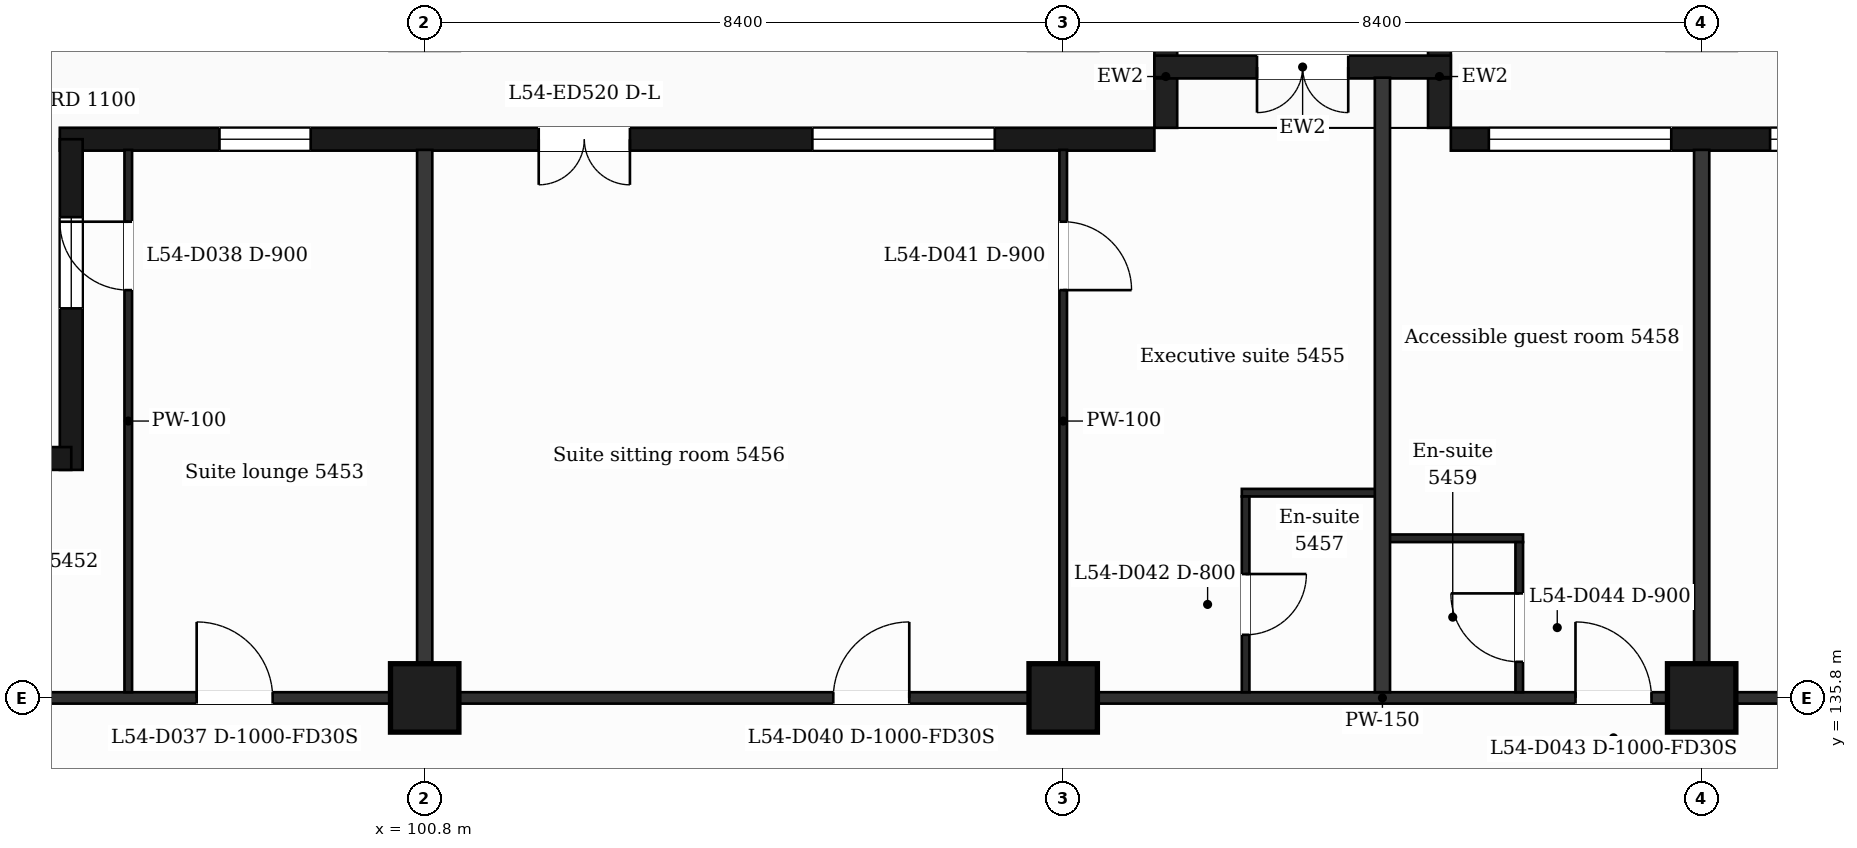
"""IFC4 building model, lengths in metres.
Left out: names, types, materials, properties, quantities, classifications, styles, units other than length and angle.
Written with IfcOpenShell. Run it as: python <this file> out.ifc"""

import sys

from ifc_helpers import new_model, si_unit, direction, frame, frame_2d, origin, origin_2d, place, context, subcontext, project, spatial, rectangle, extrude, element, fill, save


model = new_model("IFC4")
c1 = context("Model", 3, precision=1e-05, world=origin(), true_north=direction((0.0, 1.0)))
c2 = subcontext(c1, "Body", "Model", "MODEL_VIEW")
j1 = project(units=[si_unit("LENGTHUNIT", "METRE"), si_unit("PLANEANGLEUNIT", "RADIAN")], contexts=[c1])
p1 = place(None, origin())
s1 = spatial("IfcSite", under=j1, at=p1, CompositionType="ELEMENT")
p2 = place(p1, origin())
s2 = spatial("IfcBuilding", under=s1, at=p2, CompositionType="ELEMENT")
p3 = place(p2, frame((0.0, 0.0, 224.4)))
s3 = spatial("IfcBuildingStorey", under=s2, at=p3, CompositionType="ELEMENT", Elevation=224.4)
for number, where, z_axis, x_axis in (
    (1, (100.8, 135.8, 0.0), (0.0, 0.0, 1.0), (1.0, 0.0, 0.0)),
    (2, (109.2, 135.8, 0.0), (0.0, 0.0, 1.0), (1.0, 0.0, 0.0)),
    (3, (117.6, 135.8, 0.0), (0.0, 0.0, 1.0), (1.0, 0.0, 0.0)),
):
    element("IfcColumn", number, at=place(p3, frame(where, z_axis=z_axis, x_axis=x_axis)), inside=s3, PredefinedType="COLUMN", context=c2, shape_type="SweptSolid", body=[
        extrude(rectangle(XDim=0.9, YDim=0.9, at=origin_2d()), origin(), (0.0, 0.0, 1.0), 3.7),
    ])
p4 = place(p3, frame((130.65, 143.15, 0.0), z_axis=(0.0, 0.0, 1.0), x_axis=(-1.0, 0.0, 0.0)))
e4 = element("IfcWall", 4, at=p4, inside=s3, PredefinedType="SOLIDWALL", context=c2, shape_type="SweptSolid", body=[
    extrude(rectangle(XDim=16.35, YDim=0.3, at=frame_2d((8.175, 0.0))), origin(), (0.0, 0.0, 1.0), 3.38),
])
p5 = place(p4, frame((1.95, 0.0, 0.9)))
e5 = element("IfcOpeningElement", 5, at=p5, cuts=e4, PredefinedType="OPENING", context=c2, shape_type="SweptSolid", body=[
    extrude(rectangle(XDim=1.2, YDim=2.1, at=frame_2d((0.6, 1.05))), frame((0.0, 0.16, 0.0), z_axis=(0.0, -1.0, 0.0), x_axis=(1.0, 0.0, 0.0)), (0.0, 0.0, 1.0), 0.32),
])
p6 = place(p4, frame((6.15, 0.0, 0.0)))
e6 = element("IfcOpeningElement", 6, at=p6, cuts=e4, PredefinedType="OPENING", context=c2, shape_type="SweptSolid", body=[
    extrude(rectangle(XDim=1.2, YDim=2.4, at=frame_2d((0.6, 1.2))), frame((0.0, 0.16, 0.0), z_axis=(0.0, -1.0, 0.0), x_axis=(1.0, 0.0, 0.0)), (0.0, 0.0, 1.0), 0.32),
])
p7 = place(p4, frame((9.75, 0.0, 0.9)))
e7 = element("IfcOpeningElement", 7, at=p7, cuts=e4, PredefinedType="OPENING", context=c2, shape_type="SweptSolid", body=[
    extrude(rectangle(XDim=2.4, YDim=2.1, at=frame_2d((1.2, 1.05))), frame((0.0, 0.16, 0.0), z_axis=(0.0, -1.0, 0.0), x_axis=(1.0, 0.0, 0.0)), (0.0, 0.0, 1.0), 0.32),
])
p8 = place(p4, frame((13.45, 0.0, 0.9)))
e8 = element("IfcOpeningElement", 8, at=p8, cuts=e4, PredefinedType="OPENING", context=c2, shape_type="SweptSolid", body=[
    extrude(rectangle(XDim=2.4, YDim=2.1, at=frame_2d((1.2, 1.05))), frame((0.0, 0.16, 0.0), z_axis=(0.0, -1.0, 0.0), x_axis=(1.0, 0.0, 0.0)), (0.0, 0.0, 1.0), 0.32),
])
p9 = place(p3, frame((110.4, 143.15, 0.0), z_axis=(0.0, 0.0, 1.0), x_axis=(-1.0, 0.0, 0.0)))
e9 = element("IfcWall", 9, at=p9, inside=s3, PredefinedType="SOLIDWALL", context=c2, shape_type="SweptSolid", body=[
    extrude(rectangle(XDim=14.4, YDim=0.3, at=frame_2d((7.2, 0.0))), origin(), (0.0, 0.0, 1.0), 3.38),
])
p10 = place(p9, frame((2.1, 0.0, 0.9)))
e10 = element("IfcOpeningElement", 10, at=p10, cuts=e9, PredefinedType="OPENING", context=c2, shape_type="SweptSolid", body=[
    extrude(rectangle(XDim=2.4, YDim=2.1, at=frame_2d((1.2, 1.05))), frame((0.0, 0.16, 0.0), z_axis=(0.0, -1.0, 0.0), x_axis=(1.0, 0.0, 0.0)), (0.0, 0.0, 1.0), 0.32),
])
p11 = place(p9, frame((6.9, 0.0, 0.0)))
e11 = element("IfcOpeningElement", 11, at=p11, cuts=e9, PredefinedType="OPENING", context=c2, shape_type="SweptSolid", body=[
    extrude(rectangle(XDim=1.2, YDim=2.4, at=frame_2d((0.6, 1.2))), frame((0.0, 0.16, 0.0), z_axis=(0.0, -1.0, 0.0), x_axis=(1.0, 0.0, 0.0)), (0.0, 0.0, 1.0), 0.32),
])
p12 = place(p9, frame((11.1, 0.0, 0.9)))
e12 = element("IfcOpeningElement", 12, at=p12, cuts=e9, PredefinedType="OPENING", context=c2, shape_type="SweptSolid", body=[
    extrude(rectangle(XDim=1.2, YDim=2.1, at=frame_2d((0.6, 1.05))), frame((0.0, 0.16, 0.0), z_axis=(0.0, -1.0, 0.0), x_axis=(1.0, 0.0, 0.0)), (0.0, 0.0, 1.0), 0.32),
])
for number, where, z_axis, x_axis in (
    (13, (114.15, 143.3, 0.0), (0.0, 0.0, 1.0), (0.0, 1.0, 0.0)),
    (14, (110.55, 143.3, 0.0), (0.0, 0.0, 1.0), (0.0, 1.0, 0.0)),
):
    element("IfcWall", number, at=place(p3, frame(where, z_axis=z_axis, x_axis=x_axis)), inside=s3, PredefinedType="SOLIDWALL", context=c2, shape_type="SweptSolid", body=[
        extrude(rectangle(XDim=1.35, YDim=0.3, at=frame_2d((0.675, 0.0))), origin(), (0.0, 0.0, 1.0), 3.38),
    ])
p13 = place(p3, frame((114.3, 144.1, 0.0), z_axis=(0.0, 0.0, 1.0), x_axis=(-1.0, 0.0, 0.0)))
e15 = element("IfcWall", 15, at=p13, inside=s3, PredefinedType="SOLIDWALL", context=c2, shape_type="SweptSolid", body=[
    extrude(rectangle(XDim=3.9, YDim=0.3, at=frame_2d((1.95, 0.0))), origin(), (0.0, 0.0, 1.0), 3.38),
])
p14 = place(p13, frame((1.35, 0.0, 0.0)))
e16 = element("IfcOpeningElement", 16, at=p14, cuts=e15, PredefinedType="OPENING", context=c2, shape_type="SweptSolid", body=[
    extrude(rectangle(XDim=1.2, YDim=2.4, at=frame_2d((0.6, 1.2))), frame((0.0, 0.16, 0.0), z_axis=(0.0, -1.0, 0.0), x_axis=(1.0, 0.0, 0.0)), (0.0, 0.0, 1.0), 0.32),
])
p15 = place(p3, frame((96.15, 143.15, 0.0), z_axis=(0.0, 0.0, 1.0), x_axis=(0.0, -1.0, 0.0)))
e17 = element("IfcWall", 17, at=p15, inside=s3, PredefinedType="SOLIDWALL", context=c2, shape_type="SweptSolid", body=[
    extrude(rectangle(XDim=4.35, YDim=0.3, at=frame_2d((2.175, 0.0))), origin(), (0.0, 0.0, 1.0), 3.38),
])
p16 = place(p15, frame((1.025, 0.0, 0.9)))
e18 = element("IfcOpeningElement", 18, at=p16, cuts=e17, PredefinedType="OPENING", context=c2, shape_type="SweptSolid", body=[
    extrude(rectangle(XDim=1.2, YDim=2.1, at=frame_2d((0.6, 1.05))), frame((0.0, 0.16, 0.0), z_axis=(0.0, -1.0, 0.0), x_axis=(1.0, 0.0, 0.0)), (0.0, 0.0, 1.0), 0.32),
])
p17 = place(p3, frame((96.15, 138.95, 0.0), z_axis=(0.0, 0.0, 1.0), x_axis=(-1.0, 0.0, 0.0)))
e19 = element("IfcWall", 19, at=p17, inside=s3, PredefinedType="SOLIDWALL", context=c2, shape_type="SweptSolid", body=[
    extrude(rectangle(XDim=5.104, YDim=0.3, at=frame_2d((2.552, 0.0))), origin(), (0.0, 0.0, 1.0), 3.38),
])
p18 = place(p17, frame((0.725, 0.0, 0.9)))
e20 = element("IfcOpeningElement", 20, at=p18, cuts=e19, PredefinedType="OPENING", context=c2, shape_type="SweptSolid", body=[
    extrude(rectangle(XDim=2.4, YDim=2.1, at=frame_2d((1.2, 1.05))), frame((0.0, 0.16, 0.0), z_axis=(0.0, -1.0, 0.0), x_axis=(1.0, 0.0, 0.0)), (0.0, 0.0, 1.0), 0.32),
])
p19 = place(p3, frame((90.895, 135.8, 0.0), z_axis=(0.0, 0.0, 1.0), x_axis=(1.0, 0.0, 0.0)))
e21 = element("IfcWall", 21, at=p19, inside=s3, PredefinedType="PARTITIONING", context=c2, shape_type="SweptSolid", body=[
    extrude(rectangle(XDim=45.011, YDim=0.15, at=frame_2d((22.505, 0.0))), origin(), (0.0, 0.0, 1.0), 3.38),
])
p20 = place(p19, frame((6.906, 0.0, 0.0)))
e22 = element("IfcOpeningElement", 22, at=p20, cuts=e21, PredefinedType="OPENING", context=c2, shape_type="SweptSolid", body=[
    extrude(rectangle(XDim=1.0, YDim=2.1, at=frame_2d((0.5, 1.05))), frame((0.0, 0.085, 0.0), z_axis=(0.0, -1.0, 0.0), x_axis=(1.0, 0.0, 0.0)), (0.0, 0.0, 1.0), 0.17),
])
p21 = place(p19, frame((15.281, 0.0, 0.0)))
e23 = element("IfcOpeningElement", 23, at=p21, cuts=e21, PredefinedType="OPENING", context=c2, shape_type="SweptSolid", body=[
    extrude(rectangle(XDim=1.0, YDim=2.1, at=frame_2d((0.5, 1.05))), frame((0.0, 0.085, 0.0), z_axis=(0.0, -1.0, 0.0), x_axis=(1.0, 0.0, 0.0)), (0.0, 0.0, 1.0), 0.17),
])
p22 = place(p19, frame((25.045, 0.0, 0.0)))
e24 = element("IfcOpeningElement", 24, at=p22, cuts=e21, PredefinedType="OPENING", context=c2, shape_type="SweptSolid", body=[
    extrude(rectangle(XDim=1.0, YDim=2.1, at=frame_2d((0.5, 1.05))), frame((0.0, 0.085, 0.0), z_axis=(0.0, -1.0, 0.0), x_axis=(1.0, 0.0, 0.0)), (0.0, 0.0, 1.0), 0.17),
])
p23 = place(p19, frame((29.531, 0.0, 0.0)))
e25 = element("IfcOpeningElement", 25, at=p23, cuts=e21, PredefinedType="OPENING", context=c2, shape_type="SweptSolid", body=[
    extrude(rectangle(XDim=0.95, YDim=2.1, at=frame_2d((0.475, 1.05))), frame((0.0, 0.085, 0.0), z_axis=(0.0, -1.0, 0.0), x_axis=(1.0, 0.0, 0.0)), (0.0, 0.0, 1.0), 0.17),
])
p24 = place(p19, frame((39.814, 0.0, 0.0)))
e26 = element("IfcOpeningElement", 26, at=p24, cuts=e21, PredefinedType="OPENING", context=c2, shape_type="SweptSolid", body=[
    extrude(rectangle(XDim=0.95, YDim=2.1, at=frame_2d((0.475, 1.05))), frame((0.0, 0.085, 0.0), z_axis=(0.0, -1.0, 0.0), x_axis=(1.0, 0.0, 0.0)), (0.0, 0.0, 1.0), 0.17),
])
p25 = place(p3, frame((113.4, 137.9, 0.0), z_axis=(0.0, 0.0, 1.0), x_axis=(1.0, 0.0, 0.0)))
e27 = element("IfcWall", 27, at=p25, inside=s3, PredefinedType="PARTITIONING", context=c2, shape_type="SweptSolid", body=[
    extrude(rectangle(XDim=1.85, YDim=0.1, at=frame_2d((0.925, 0.0))), origin(), (0.0, 0.0, 1.0), 3.38),
])
p26 = place(p3, frame((111.55, 138.5, 0.0), z_axis=(0.0, 0.0, 1.0), x_axis=(1.0, 0.0, 0.0)))
e28 = element("IfcWall", 28, at=p26, inside=s3, PredefinedType="PARTITIONING", context=c2, shape_type="SweptSolid", body=[
    extrude(rectangle(XDim=1.85, YDim=0.1, at=frame_2d((0.925, 0.0))), origin(), (0.0, 0.0, 1.0), 3.38),
])
p27 = place(p3, frame((96.9, 135.875, 0.0), z_axis=(0.0, 0.0, 1.0), x_axis=(0.0, 1.0, 0.0)))
e29 = element("IfcWall", 29, at=p27, inside=s3, PredefinedType="PARTITIONING", context=c2, shape_type="SweptSolid", body=[
    extrude(rectangle(XDim=7.135, YDim=0.1, at=frame_2d((3.567, 0.0))), origin(), (0.0, 0.0, 1.0), 3.38),
])
p28 = place(p27, frame((5.29, 0.0, 0.0)))
e30 = element("IfcOpeningElement", 30, at=p28, cuts=e29, PredefinedType="OPENING", context=c2, shape_type="SweptSolid", body=[
    extrude(rectangle(XDim=0.9, YDim=2.1, at=frame_2d((0.45, 1.05))), frame((0.0, 0.06, 0.0), z_axis=(0.0, -1.0, 0.0), x_axis=(1.0, 0.0, 0.0)), (0.0, 0.0, 1.0), 0.12),
])
p29 = place(p3, frame((100.8, 135.875, 0.0), z_axis=(0.0, 0.0, 1.0), x_axis=(0.0, 1.0, 0.0)))
e31 = element("IfcWall", 31, at=p29, inside=s3, PredefinedType="PARTITIONING", context=c2, shape_type="SweptSolid", body=[
    extrude(rectangle(XDim=7.135, YDim=0.2, at=frame_2d((3.567, 0.0))), origin(), (0.0, 0.0, 1.0), 3.38),
])
p30 = place(p3, frame((109.2, 135.875, 0.0), z_axis=(0.0, 0.0, 1.0), x_axis=(0.0, 1.0, 0.0)))
e32 = element("IfcWall", 32, at=p30, inside=s3, PredefinedType="PARTITIONING", context=c2, shape_type="SweptSolid", body=[
    extrude(rectangle(XDim=7.135, YDim=0.1, at=frame_2d((3.567, 0.0))), origin(), (0.0, 0.0, 1.0), 3.38),
])
p31 = place(p30, frame((5.29, 0.0, 0.0)))
e33 = element("IfcOpeningElement", 33, at=p31, cuts=e32, PredefinedType="OPENING", context=c2, shape_type="SweptSolid", body=[
    extrude(rectangle(XDim=0.9, YDim=2.1, at=frame_2d((0.45, 1.05))), frame((0.0, 0.06, 0.0), z_axis=(0.0, -1.0, 0.0), x_axis=(1.0, 0.0, 0.0)), (0.0, 0.0, 1.0), 0.12),
])
p32 = place(p3, frame((111.6, 135.875, 0.0), z_axis=(0.0, 0.0, 1.0), x_axis=(0.0, 1.0, 0.0)))
e34 = element("IfcWall", 34, at=p32, inside=s3, PredefinedType="PARTITIONING", context=c2, shape_type="SweptSolid", body=[
    extrude(rectangle(XDim=2.575, YDim=0.1, at=frame_2d((1.288, 0.0))), origin(), (0.0, 0.0, 1.0), 3.38),
])
p33 = place(p32, frame((0.755, 0.0, 0.0)))
e35 = element("IfcOpeningElement", 35, at=p33, cuts=e34, PredefinedType="OPENING", context=c2, shape_type="SweptSolid", body=[
    extrude(rectangle(XDim=0.8, YDim=2.1, at=frame_2d((0.4, 1.05))), frame((0.0, 0.06, 0.0), z_axis=(0.0, -1.0, 0.0), x_axis=(1.0, 0.0, 0.0)), (0.0, 0.0, 1.0), 0.12),
])
p34 = place(p3, frame((113.4, 135.875, 0.0), z_axis=(0.0, 0.0, 1.0), x_axis=(0.0, 1.0, 0.0)))
e36 = element("IfcWall", 36, at=p34, inside=s3, PredefinedType="PARTITIONING", context=c2, shape_type="SweptSolid", body=[
    extrude(rectangle(XDim=8.085, YDim=0.2, at=frame_2d((4.042, 0.0))), origin(), (0.0, 0.0, 1.0), 3.38),
])
p35 = place(p3, frame((115.2, 135.875, 0.0), z_axis=(0.0, 0.0, 1.0), x_axis=(0.0, 1.0, 0.0)))
e37 = element("IfcWall", 37, at=p35, inside=s3, PredefinedType="PARTITIONING", context=c2, shape_type="SweptSolid", body=[
    extrude(rectangle(XDim=1.975, YDim=0.1, at=frame_2d((0.988, 0.0))), origin(), (0.0, 0.0, 1.0), 3.38),
])
p36 = place(p35, frame((0.4, 0.0, 0.0)))
e38 = element("IfcOpeningElement", 38, at=p36, cuts=e37, PredefinedType="OPENING", context=c2, shape_type="SweptSolid", body=[
    extrude(rectangle(XDim=0.9, YDim=2.1, at=frame_2d((0.45, 1.05))), frame((0.0, 0.06, 0.0), z_axis=(0.0, -1.0, 0.0), x_axis=(1.0, 0.0, 0.0)), (0.0, 0.0, 1.0), 0.12),
])
p37 = place(p3, frame((117.6, 135.875, 0.0), z_axis=(0.0, 0.0, 1.0), x_axis=(0.0, 1.0, 0.0)))
e39 = element("IfcWall", 39, at=p37, inside=s3, PredefinedType="PARTITIONING", context=c2, shape_type="SweptSolid", body=[
    extrude(rectangle(XDim=7.135, YDim=0.2, at=frame_2d((3.567, 0.0))), origin(), (0.0, 0.0, 1.0), 3.38),
])
p38 = place(p7, origin())
e40 = element("IfcWindow", 40, at=p38, inside=s3, PartitioningType="SINGLE_PANEL", PredefinedType="WINDOW", context=c2, shape_type="SweptSolid", body=[
    extrude(rectangle(XDim=2.4, YDim=2.1, at=frame_2d((1.2, 1.05))), frame((0.0, 0.03, 0.0), z_axis=(0.0, -1.0, 0.0), x_axis=(1.0, 0.0, 0.0)), (0.0, 0.0, 1.0), 0.06),
])
fill(e7, e40)
p39 = place(p8, origin())
e41 = element("IfcWindow", 41, at=p39, inside=s3, PartitioningType="SINGLE_PANEL", PredefinedType="WINDOW", context=c2, shape_type="SweptSolid", body=[
    extrude(rectangle(XDim=2.4, YDim=2.1, at=frame_2d((1.2, 1.05))), frame((0.0, 0.03, 0.0), z_axis=(0.0, -1.0, 0.0), x_axis=(1.0, 0.0, 0.0)), (0.0, 0.0, 1.0), 0.06),
])
fill(e8, e41)
p40 = place(p10, origin())
e42 = element("IfcWindow", 42, at=p40, inside=s3, PartitioningType="SINGLE_PANEL", PredefinedType="WINDOW", context=c2, shape_type="SweptSolid", body=[
    extrude(rectangle(XDim=2.4, YDim=2.1, at=frame_2d((1.2, 1.05))), frame((0.0, 0.03, 0.0), z_axis=(0.0, -1.0, 0.0), x_axis=(1.0, 0.0, 0.0)), (0.0, 0.0, 1.0), 0.06),
])
fill(e10, e42)
p41 = place(p11, origin())
e43 = element("IfcDoor", 43, at=p41, inside=s3, OperationType="DOUBLE_DOOR_SINGLE_SWING", PredefinedType="DOOR", context=c2, shape_type="SweptSolid", body=[
    extrude(rectangle(XDim=1.2, YDim=2.4, at=frame_2d((0.6, 1.2))), frame((0.0, 0.025, 0.0), z_axis=(0.0, -1.0, 0.0), x_axis=(1.0, 0.0, 0.0)), (0.0, 0.0, 1.0), 0.05),
])
fill(e11, e43)
p42 = place(p12, origin())
e44 = element("IfcWindow", 44, at=p42, inside=s3, PartitioningType="SINGLE_PANEL", PredefinedType="WINDOW", context=c2, shape_type="SweptSolid", body=[
    extrude(rectangle(XDim=1.2, YDim=2.1, at=frame_2d((0.6, 1.05))), frame((0.0, 0.03, 0.0), z_axis=(0.0, -1.0, 0.0), x_axis=(1.0, 0.0, 0.0)), (0.0, 0.0, 1.0), 0.06),
])
fill(e12, e44)
p43 = place(p14, origin())
e45 = element("IfcDoor", 45, at=p43, inside=s3, OperationType="DOUBLE_DOOR_SINGLE_SWING", PredefinedType="DOOR", context=c2, shape_type="SweptSolid", body=[
    extrude(rectangle(XDim=1.2, YDim=2.4, at=frame_2d((0.6, 1.2))), frame((0.0, 0.025, 0.0), z_axis=(0.0, -1.0, 0.0), x_axis=(1.0, 0.0, 0.0)), (0.0, 0.0, 1.0), 0.05),
])
fill(e16, e45)
p44 = place(p16, origin())
e46 = element("IfcWindow", 46, at=p44, inside=s3, PartitioningType="SINGLE_PANEL", PredefinedType="WINDOW", context=c2, shape_type="SweptSolid", body=[
    extrude(rectangle(XDim=1.2, YDim=2.1, at=frame_2d((0.6, 1.05))), frame((0.0, 0.03, 0.0), z_axis=(0.0, -1.0, 0.0), x_axis=(1.0, 0.0, 0.0)), (0.0, 0.0, 1.0), 0.06),
])
fill(e18, e46)
p45 = place(p20, origin())
e47 = element("IfcDoor", 47, at=p45, inside=s3, OperationType="SINGLE_SWING_LEFT", PredefinedType="DOOR", context=c2, shape_type="SweptSolid", body=[
    extrude(rectangle(XDim=1.0, YDim=2.1, at=frame_2d((0.5, 1.05))), frame((0.0, 0.025, 0.0), z_axis=(0.0, -1.0, 0.0), x_axis=(1.0, 0.0, 0.0)), (0.0, 0.0, 1.0), 0.05),
])
fill(e22, e47)
p46 = place(p28, origin())
e48 = element("IfcDoor", 48, at=p46, inside=s3, OperationType="SINGLE_SWING_RIGHT", PredefinedType="DOOR", context=c2, shape_type="SweptSolid", body=[
    extrude(rectangle(XDim=0.9, YDim=2.1, at=frame_2d((0.45, 1.05))), frame((0.0, 0.025, 0.0), z_axis=(0.0, -1.0, 0.0), x_axis=(1.0, 0.0, 0.0)), (0.0, 0.0, 1.0), 0.05),
])
fill(e30, e48)
p47 = place(p21, origin())
e49 = element("IfcDoor", 49, at=p47, inside=s3, OperationType="SINGLE_SWING_RIGHT", PredefinedType="DOOR", context=c2, shape_type="SweptSolid", body=[
    extrude(rectangle(XDim=1.0, YDim=2.1, at=frame_2d((0.5, 1.05))), frame((0.0, 0.025, 0.0), z_axis=(0.0, -1.0, 0.0), x_axis=(1.0, 0.0, 0.0)), (0.0, 0.0, 1.0), 0.05),
])
fill(e23, e49)
p48 = place(p31, origin())
e50 = element("IfcDoor", 50, at=p48, inside=s3, OperationType="SINGLE_SWING_LEFT", PredefinedType="DOOR", context=c2, shape_type="SweptSolid", body=[
    extrude(rectangle(XDim=0.9, YDim=2.1, at=frame_2d((0.45, 1.05))), frame((0.0, 0.025, 0.0), z_axis=(0.0, -1.0, 0.0), x_axis=(1.0, 0.0, 0.0)), (0.0, 0.0, 1.0), 0.05),
])
fill(e33, e50)
p49 = place(p33, origin())
e51 = element("IfcDoor", 51, at=p49, inside=s3, OperationType="SINGLE_SWING_RIGHT", PredefinedType="DOOR", context=c2, shape_type="SweptSolid", body=[
    extrude(rectangle(XDim=0.8, YDim=2.1, at=frame_2d((0.4, 1.05))), frame((0.0, 0.025, 0.0), z_axis=(0.0, -1.0, 0.0), x_axis=(1.0, 0.0, 0.0)), (0.0, 0.0, 1.0), 0.05),
])
fill(e35, e51)
p50 = place(p22, origin())
e52 = element("IfcDoor", 52, at=p50, inside=s3, OperationType="SINGLE_SWING_LEFT", PredefinedType="DOOR", context=c2, shape_type="SweptSolid", body=[
    extrude(rectangle(XDim=1.0, YDim=2.1, at=frame_2d((0.5, 1.05))), frame((0.0, 0.025, 0.0), z_axis=(0.0, -1.0, 0.0), x_axis=(1.0, 0.0, 0.0)), (0.0, 0.0, 1.0), 0.05),
])
fill(e24, e52)
p51 = place(p36, origin())
e53 = element("IfcDoor", 53, at=p51, inside=s3, OperationType="SINGLE_SWING_RIGHT", PredefinedType="DOOR", context=c2, shape_type="SweptSolid", body=[
    extrude(rectangle(XDim=0.9, YDim=2.1, at=frame_2d((0.45, 1.05))), frame((0.0, 0.025, 0.0), z_axis=(0.0, -1.0, 0.0), x_axis=(1.0, 0.0, 0.0)), (0.0, 0.0, 1.0), 0.05),
])
fill(e38, e53)
save(model, sys.argv[1])
